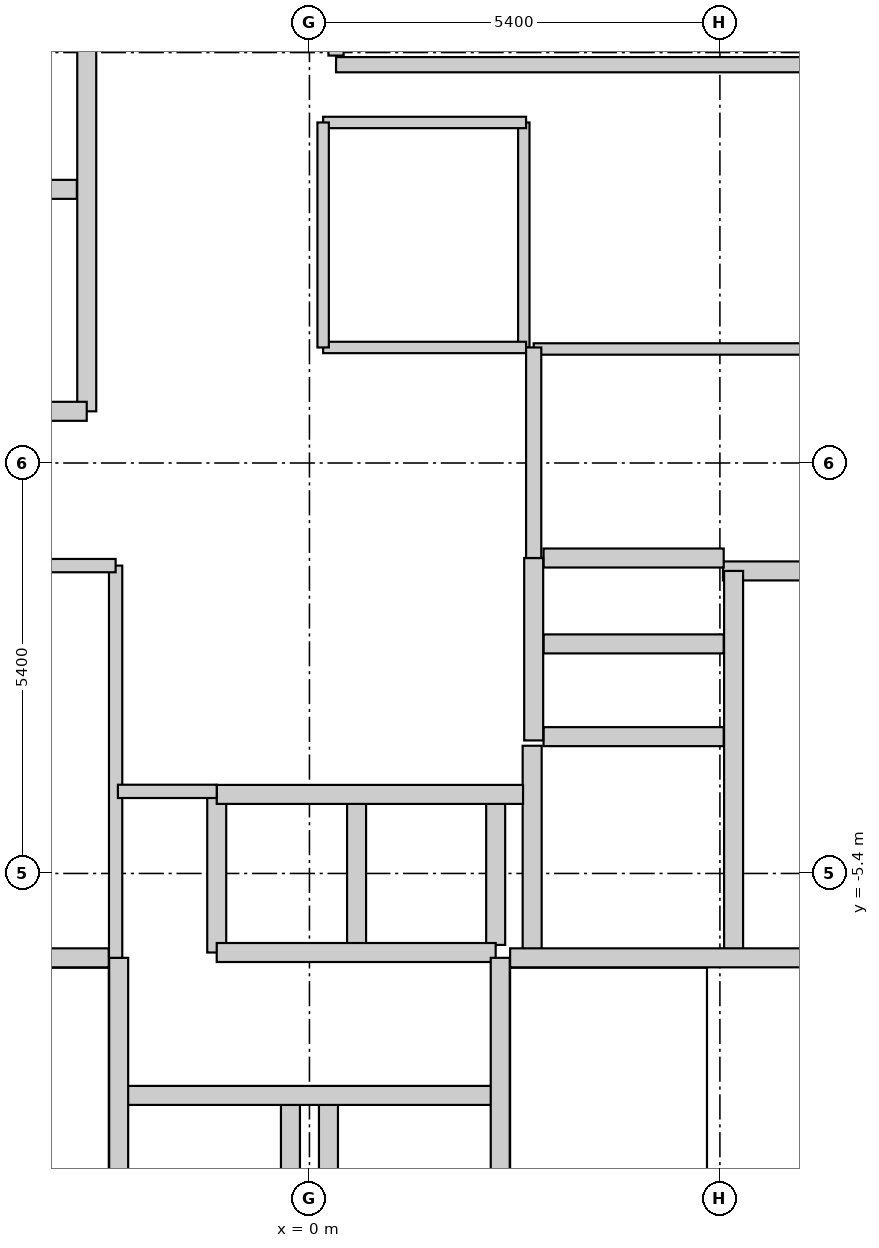
"""IFC4 building model, lengths in metres.
Left out: names, types, materials, properties, quantities, classifications, styles, units other than length and angle.
Written with IfcOpenShell. Run it as: python <this file> out.ifc"""

import sys

from ifc_helpers import new_model, si_unit, direction, frame, frame_2d, origin, place, context, subcontext, project, spatial, rectangle, extrude, element, fill, save


model = new_model("IFC4")
c1 = context("Model", 3, precision=1e-05, world=origin(), true_north=direction((0.0, 1.0)))
c2 = subcontext(c1, "Body", "Model", "MODEL_VIEW")
j1 = project(units=[si_unit("LENGTHUNIT", "METRE"), si_unit("PLANEANGLEUNIT", "RADIAN")], contexts=[c1])
p1 = place(None, origin())
s1 = spatial("IfcSite", under=j1, at=p1, CompositionType="ELEMENT")
p2 = place(p1, origin())
s2 = spatial("IfcBuilding", under=s1, at=p2, CompositionType="ELEMENT")
p3 = place(p2, frame((0.0, 0.0, 337.5)))
s3 = spatial("IfcBuildingStorey", under=s2, at=p3, CompositionType="ELEMENT", Elevation=337.5)
p4 = place(p3, frame((2.93, -6.51, 0.0), z_axis=(0.0, 0.0, 1.0), x_axis=(0.0, 1.0, 0.0)))
e1 = element("IfcWall", 1, at=p4, inside=s3, PredefinedType="SHEAR", context=c2, shape_type="SweptSolid", body=[
    extrude(rectangle(XDim=2.79, YDim=0.25, at=frame_2d((1.395, 0.0))), origin(), (0.0, 0.0, 1.0), 4.5),
])
p5 = place(p3, frame((5.44, -1.42, 0.0), z_axis=(0.0, 0.0, 1.0), x_axis=(1.0, 0.0, 0.0)))
e2 = element("IfcWall", 2, at=p5, inside=s3, PredefinedType="SHEAR", context=c2, shape_type="SweptSolid", body=[
    extrude(rectangle(XDim=4.9, YDim=0.25, at=frame_2d((2.45, 0.0))), origin(), (0.0, 0.0, 1.0), 4.5),
])
p6 = place(p5, frame((1.94, 0.0, 0.0)))
e3 = element("IfcOpeningElement", 3, at=p6, cuts=e2, PredefinedType="OPENING", context=c2, shape_type="SweptSolid", body=[
    extrude(rectangle(XDim=1.1, YDim=2.1, at=frame_2d((0.55, 1.05))), frame((0.0, 0.135, 0.0), z_axis=(0.0, -1.0, 0.0), x_axis=(1.0, 0.0, 0.0)), (0.0, 0.0, 1.0), 0.27),
])
p7 = place(p3, frame((3.08, -3.6, 0.0), z_axis=(0.0, 0.0, 1.0), x_axis=(1.0, 0.0, 0.0)))
e4 = element("IfcWall", 4, at=p7, inside=s3, PredefinedType="SHEAR", context=c2, shape_type="SweptSolid", body=[
    extrude(rectangle(XDim=2.37, YDim=0.25, at=frame_2d((1.185, 0.0))), origin(), (0.0, 0.0, 1.0), 4.5),
])
p8 = place(p3, frame((5.58, -6.51, 0.0), z_axis=(0.0, 0.0, 1.0), x_axis=(0.0, 1.0, 0.0)))
e5 = element("IfcWall", 5, at=p8, inside=s3, PredefinedType="SHEAR", context=c2, shape_type="SweptSolid", body=[
    extrude(rectangle(XDim=5.09, YDim=0.25, at=frame_2d((2.545, 0.0))), origin(), (0.0, 0.0, 1.0), 4.5),
])
p9 = place(p8, frame((0.85, 0.0, 0.0)))
e6 = element("IfcOpeningElement", 6, at=p9, cuts=e5, PredefinedType="OPENING", context=c2, shape_type="SweptSolid", body=[
    extrude(rectangle(XDim=1.1, YDim=2.1, at=frame_2d((0.55, 1.05))), frame((0.0, 0.135, 0.0), z_axis=(0.0, -1.0, 0.0), x_axis=(1.0, 0.0, 0.0)), (0.0, 0.0, 1.0), 0.27),
])
for number, where, z_axis, x_axis in (
    (7, (0.62, -6.34, 0.0), (0.0, 0.0, 1.0), (0.0, 1.0, 0.0)),
    (8, (2.45, -6.34, 0.0), (0.0, 0.0, 1.0), (0.0, 1.0, 0.0)),
):
    element("IfcWall", number, at=place(p3, frame(where, z_axis=z_axis, x_axis=x_axis)), inside=s3, PredefinedType="SHEAR", context=c2, shape_type="SweptSolid", body=[
        extrude(rectangle(XDim=1.88, YDim=0.25, at=frame_2d((0.94, 0.0))), origin(), (0.0, 0.0, 1.0), 4.5),
    ])
for number, where, z_axis, x_axis in (
    (9, (-0.25, -10.35, 0.0), (0.0, 0.0, 1.0), (0.0, 1.0, 0.0)),
    (10, (0.25, -10.35, 0.0), (0.0, 0.0, 1.0), (0.0, 1.0, 0.0)),
):
    element("IfcWall", number, at=place(p3, frame(where, z_axis=z_axis, x_axis=x_axis)), inside=s3, PredefinedType="SHEAR", context=c2, shape_type="SweptSolid", body=[
        extrude(rectangle(XDim=1.91, YDim=0.25, at=frame_2d((0.955, 0.0))), origin(), (0.0, 0.0, 1.0), 4.5),
    ])
p10 = place(p3, frame((-1.22, -6.44, 0.0), z_axis=(0.0, 0.0, 1.0), x_axis=(0.0, 1.0, 0.0)))
e11 = element("IfcWall", 11, at=p10, inside=s3, PredefinedType="SHEAR", context=c2, shape_type="SweptSolid", body=[
    extrude(rectangle(XDim=2.08, YDim=0.25, at=frame_2d((1.04, 0.0))), origin(), (0.0, 0.0, 1.0), 4.5),
])
p11 = place(p3, frame((-1.22, -6.44, 0.0), z_axis=(0.0, 0.0, 1.0), x_axis=(1.0, 0.0, 0.0)))
e12 = element("IfcWall", 12, at=p11, inside=s3, PredefinedType="SHEAR", context=c2, shape_type="SweptSolid", body=[
    extrude(rectangle(XDim=3.67, YDim=0.25, at=frame_2d((1.835, 0.0))), origin(), (0.0, 0.0, 1.0), 4.5),
])
p12 = place(p11, frame((0.35, 0.0, 0.0)))
e13 = element("IfcOpeningElement", 13, at=p12, cuts=e12, PredefinedType="OPENING", context=c2, shape_type="SweptSolid", body=[
    extrude(rectangle(XDim=1.1, YDim=2.1, at=frame_2d((0.55, 1.05))), frame((0.0, 0.135, 0.0), z_axis=(0.0, -1.0, 0.0), x_axis=(1.0, 0.0, 0.0)), (0.0, 0.0, 1.0), 0.27),
])
p13 = place(p11, frame((2.22, 0.0, 0.0)))
e14 = element("IfcOpeningElement", 14, at=p13, cuts=e12, PredefinedType="OPENING", context=c2, shape_type="SweptSolid", body=[
    extrude(rectangle(XDim=1.1, YDim=2.1, at=frame_2d((0.55, 1.05))), frame((0.0, 0.135, 0.0), z_axis=(0.0, -1.0, 0.0), x_axis=(1.0, 0.0, 0.0)), (0.0, 0.0, 1.0), 0.27),
])
p14 = place(p3, frame((-2.48, -8.32, 0.0), z_axis=(0.0, 0.0, 1.0), x_axis=(1.0, 0.0, 0.0)))
e15 = element("IfcWall", 15, at=p14, inside=s3, PredefinedType="SHEAR", context=c2, shape_type="SweptSolid", body=[
    extrude(rectangle(XDim=4.93, YDim=0.25, at=frame_2d((2.465, 0.0))), origin(), (0.0, 0.0, 1.0), 4.5),
])
p15 = place(p14, frame((0.55, 0.0, 0.0)))
e16 = element("IfcOpeningElement", 16, at=p15, cuts=e15, PredefinedType="OPENING", context=c2, shape_type="SweptSolid", body=[
    extrude(rectangle(XDim=1.1, YDim=2.1, at=frame_2d((0.55, 1.05))), frame((0.0, 0.135, 0.0), z_axis=(0.0, -1.0, 0.0), x_axis=(1.0, 0.0, 0.0)), (0.0, 0.0, 1.0), 0.27),
])
p16 = place(p14, frame((3.25, 0.0, 0.0)))
e17 = element("IfcOpeningElement", 17, at=p16, cuts=e15, PredefinedType="OPENING", context=c2, shape_type="SweptSolid", body=[
    extrude(rectangle(XDim=1.1, YDim=2.1, at=frame_2d((0.55, 1.05))), frame((0.0, 0.135, 0.0), z_axis=(0.0, -1.0, 0.0), x_axis=(1.0, 0.0, 0.0)), (0.0, 0.0, 1.0), 0.27),
])
p17 = place(p3, frame((-1.22, -4.36, 0.0), z_axis=(0.0, 0.0, 1.0), x_axis=(1.0, 0.0, 0.0)))
e18 = element("IfcWall", 18, at=p17, inside=s3, PredefinedType="SHEAR", context=c2, shape_type="SweptSolid", body=[
    extrude(rectangle(XDim=4.03, YDim=0.25, at=frame_2d((2.015, 0.0))), origin(), (0.0, 0.0, 1.0), 4.5),
])
for number, where, z_axis, x_axis in (
    (19, (3.08, -2.38, 0.0), (0.0, 0.0, 1.0), (1.0, 0.0, 0.0)),
    (20, (3.08, -1.25, 0.0), (0.0, 0.0, 1.0), (1.0, 0.0, 0.0)),
):
    element("IfcWall", number, at=place(p3, frame(where, z_axis=z_axis, x_axis=x_axis)), inside=s3, PredefinedType="SHEAR", context=c2, shape_type="SweptSolid", body=[
        extrude(rectangle(XDim=2.37, YDim=0.25, at=frame_2d((1.185, 0.0))), origin(), (0.0, 0.0, 1.0), 4.5),
    ])
p18 = place(p3, frame((2.95, -3.65, 0.0), z_axis=(0.0, 0.0, 1.0), x_axis=(0.0, 1.0, 0.0)))
e21 = element("IfcWall", 21, at=p18, inside=s3, PredefinedType="SHEAR", context=c2, shape_type="SweptSolid", body=[
    extrude(rectangle(XDim=2.4, YDim=0.25, at=frame_2d((1.2, 0.0))), origin(), (0.0, 0.0, 1.0), 4.5),
])
p19 = place(p18, frame((0.775, 0.0, 0.0)))
e22 = element("IfcOpeningElement", 22, at=p19, cuts=e21, PredefinedType="OPENING", context=c2, shape_type="SweptSolid", body=[
    extrude(rectangle(XDim=0.85, YDim=2.1, at=frame_2d((0.425, 1.05))), frame((0.0, 0.135, 0.0), z_axis=(0.0, -1.0, 0.0), x_axis=(1.0, 0.0, 0.0)), (0.0, 0.0, 1.0), 0.27),
])
p20 = place(p3, frame((2.64, -6.51, 0.0), z_axis=(0.0, 0.0, 1.0), x_axis=(1.0, 0.0, 0.0)))
e23 = element("IfcWall", 23, at=p20, inside=s3, PredefinedType="SHEAR", context=c2, shape_type="SweptSolid", body=[
    extrude(rectangle(XDim=7.7, YDim=0.25, at=frame_2d((3.85, 0.0))), origin(), (0.0, 0.0, 1.0), 4.5),
])
p21 = place(p20, frame((6.0, 0.0, 0.0)))
e24 = element("IfcOpeningElement", 24, at=p21, cuts=e23, PredefinedType="OPENING", context=c2, shape_type="SweptSolid", body=[
    extrude(rectangle(XDim=0.95, YDim=2.1, at=frame_2d((0.475, 1.05))), frame((0.0, 0.135, 0.0), z_axis=(0.0, -1.0, 0.0), x_axis=(1.0, 0.0, 0.0)), (0.0, 0.0, 1.0), 0.27),
])
for number, where, z_axis, x_axis in (
    (25, (2.51, -10.55, 0.0), (0.0, 0.0, 1.0), (0.0, 1.0, 0.0)),
    (26, (-2.51, -10.55, 0.0), (0.0, 0.0, 1.0), (0.0, 1.0, 0.0)),
):
    element("IfcWall", number, at=place(p3, frame(where, z_axis=z_axis, x_axis=x_axis)), inside=s3, PredefinedType="SHEAR", context=c2, shape_type="SweptSolid", body=[
        extrude(rectangle(XDim=4.04, YDim=0.25, at=frame_2d((2.02, 0.0))), origin(), (0.0, 0.0, 1.0), 4.5),
    ])
p22 = place(p3, frame((-10.34, -6.51, 0.0), z_axis=(0.0, 0.0, 1.0), x_axis=(1.0, 0.0, 0.0)))
e27 = element("IfcWall", 27, at=p22, inside=s3, PredefinedType="SHEAR", context=c2, shape_type="SweptSolid", body=[
    extrude(rectangle(XDim=7.7, YDim=0.25, at=frame_2d((3.85, 0.0))), origin(), (0.0, 0.0, 1.0), 4.5),
])
p23 = place(p22, frame((0.35, 0.0, 0.0)))
e28 = element("IfcOpeningElement", 28, at=p23, cuts=e27, PredefinedType="OPENING", context=c2, shape_type="SweptSolid", body=[
    extrude(rectangle(XDim=1.1, YDim=2.1, at=frame_2d((0.55, 1.05))), frame((0.0, 0.135, 0.0), z_axis=(0.0, -1.0, 0.0), x_axis=(1.0, 0.0, 0.0)), (0.0, 0.0, 1.0), 0.27),
])
p24 = place(p3, frame((-2.93, 0.68, 0.0), z_axis=(0.0, 0.0, 1.0), x_axis=(0.0, 1.0, 0.0)))
e29 = element("IfcWall", 29, at=p24, inside=s3, PredefinedType="SHEAR", context=c2, shape_type="SweptSolid", body=[
    extrude(rectangle(XDim=5.83, YDim=0.25, at=frame_2d((2.915, 0.0))), origin(), (0.0, 0.0, 1.0), 4.5),
])
p25 = place(p24, frame((0.75, 0.0, 0.0)))
e30 = element("IfcOpeningElement", 30, at=p25, cuts=e29, PredefinedType="OPENING", context=c2, shape_type="SweptSolid", body=[
    extrude(rectangle(XDim=1.2, YDim=2.1, at=frame_2d((0.6, 1.05))), frame((0.0, 0.135, 0.0), z_axis=(0.0, -1.0, 0.0), x_axis=(1.0, 0.0, 0.0)), (0.0, 0.0, 1.0), 0.27),
])
p26 = place(p3, frame((-5.45, 3.6, 0.0), z_axis=(0.0, 0.0, 1.0), x_axis=(1.0, 0.0, 0.0)))
e31 = element("IfcWall", 31, at=p26, inside=s3, PredefinedType="SHEAR", context=c2, shape_type="SweptSolid", body=[
    extrude(rectangle(XDim=2.39, YDim=0.25, at=frame_2d((1.195, 0.0))), origin(), (0.0, 0.0, 1.0), 4.5),
])
p27 = place(p3, frame((-5.58, 0.68, 0.0), z_axis=(0.0, 0.0, 1.0), x_axis=(1.0, 0.0, 0.0)))
e32 = element("IfcWall", 32, at=p27, inside=s3, PredefinedType="SHEAR", context=c2, shape_type="SweptSolid", body=[
    extrude(rectangle(XDim=2.65, YDim=0.25, at=frame_2d((1.325, 0.0))), origin(), (0.0, 0.0, 1.0), 4.5),
])
p28 = place(p3, frame((2.82, 1.52, 0.0), z_axis=(0.0, 0.0, 1.0), x_axis=(0.0, 1.0, 0.0)))
e33 = element("IfcWall", 33, at=p28, inside=s3, PredefinedType="PARTITIONING", context=c2, shape_type="SweptSolid", body=[
    extrude(rectangle(XDim=2.96, YDim=0.15, at=frame_2d((1.48, 0.0))), origin(), (0.0, 0.0, 1.0), 4.22),
])
for number, where, z_axis, x_axis in (
    (34, (0.18, 4.48, 0.0), (0.0, 0.0, 1.0), (1.0, 0.0, 0.0)),
    (35, (0.18, 1.52, 0.0), (0.0, 0.0, 1.0), (1.0, 0.0, 0.0)),
):
    element("IfcWall", number, at=place(p3, frame(where, z_axis=z_axis, x_axis=x_axis)), inside=s3, PredefinedType="PARTITIONING", context=c2, shape_type="SweptSolid", body=[
        extrude(rectangle(XDim=2.67, YDim=0.15, at=frame_2d((1.335, 0.0))), origin(), (0.0, 0.0, 1.0), 4.22),
    ])
p29 = place(p3, frame((0.18, 1.52, 0.0), z_axis=(0.0, 0.0, 1.0), x_axis=(0.0, 1.0, 0.0)))
e36 = element("IfcWall", 36, at=p29, inside=s3, PredefinedType="PARTITIONING", context=c2, shape_type="SweptSolid", body=[
    extrude(rectangle(XDim=2.96, YDim=0.15, at=frame_2d((1.48, 0.0))), origin(), (0.0, 0.0, 1.0), 4.22),
])
p30 = place(p29, frame((0.95, 0.0, 0.0)))
e37 = element("IfcOpeningElement", 37, at=p30, cuts=e36, PredefinedType="OPENING", context=c2, shape_type="SweptSolid", body=[
    extrude(rectangle(XDim=0.85, YDim=2.1, at=frame_2d((0.425, 1.05))), frame((0.0, 0.085, 0.0), z_axis=(0.0, -1.0, 0.0), x_axis=(1.0, 0.0, 0.0)), (0.0, 0.0, 1.0), 0.17),
])
p31 = place(p3, frame((2.95, 1.5, 0.0), z_axis=(0.0, 0.0, 1.0), x_axis=(1.0, 0.0, 0.0)))
e38 = element("IfcWall", 38, at=p31, inside=s3, PredefinedType="PARTITIONING", context=c2, shape_type="SweptSolid", body=[
    extrude(rectangle(XDim=7.39, YDim=0.15, at=frame_2d((3.695, 0.0))), origin(), (0.0, 0.0, 1.0), 4.22),
])
p32 = place(p31, frame((2.2, 0.0, 0.0)))
e39 = element("IfcOpeningElement", 39, at=p32, cuts=e38, PredefinedType="OPENING", context=c2, shape_type="SweptSolid", body=[
    extrude(rectangle(XDim=0.95, YDim=2.1, at=frame_2d((0.475, 1.05))), frame((0.0, 0.085, 0.0), z_axis=(0.0, -1.0, 0.0), x_axis=(1.0, 0.0, 0.0)), (0.0, 0.0, 1.0), 0.17),
])
p33 = place(p3, frame((0.35, 5.24, 0.0), z_axis=(0.0, 0.0, 1.0), x_axis=(1.0, 0.0, 0.0)))
e40 = element("IfcWall", 40, at=p33, inside=s3, PredefinedType="PARTITIONING", context=c2, shape_type="SweptSolid", body=[
    extrude(rectangle(XDim=9.99, YDim=0.2, at=frame_2d((4.995, 0.0))), origin(), (0.0, 0.0, 1.0), 4.22),
])
p34 = place(p33, frame((0.8, 0.0, 0.0)))
e41 = element("IfcOpeningElement", 41, at=p34, cuts=e40, PredefinedType="OPENING", context=c2, shape_type="SweptSolid", body=[
    extrude(rectangle(XDim=1.1, YDim=2.1, at=frame_2d((0.55, 1.05))), frame((0.0, 0.11, 0.0), z_axis=(0.0, -1.0, 0.0), x_axis=(1.0, 0.0, 0.0)), (0.0, 0.0, 1.0), 0.22),
])
p35 = place(p3, frame((0.35, 5.36, 0.0), z_axis=(0.0, 0.0, 1.0), x_axis=(0.0, 1.0, 0.0)))
e42 = element("IfcWall", 42, at=p35, inside=s3, PredefinedType="PARTITIONING", context=c2, shape_type="SweptSolid", body=[
    extrude(rectangle(XDim=4.98, YDim=0.2, at=frame_2d((2.49, 0.0))), origin(), (0.0, 0.0, 1.0), 4.22),
])
p36 = place(p3, frame((-2.55, -6.51, 0.0), z_axis=(0.0, 0.0, 1.0), x_axis=(0.0, 1.0, 0.0)))
e43 = element("IfcWall", 43, at=p36, inside=s3, PredefinedType="PARTITIONING", context=c2, shape_type="SweptSolid", body=[
    extrude(rectangle(XDim=5.16, YDim=0.175, at=frame_2d((2.58, 0.0))), origin(), (0.0, 0.0, 1.0), 4.22),
])
p37 = place(p36, frame((0.95, 0.0, 0.0)))
e44 = element("IfcOpeningElement", 44, at=p37, cuts=e43, PredefinedType="OPENING", context=c2, shape_type="SweptSolid", body=[
    extrude(rectangle(XDim=0.85, YDim=2.1, at=frame_2d((0.425, 1.05))), frame((0.0, 0.097, 0.0), z_axis=(0.0, -1.0, 0.0), x_axis=(1.0, 0.0, 0.0)), (0.0, 0.0, 1.0), 0.195),
])
p38 = place(p3, frame((-7.18, -1.35, 0.0), z_axis=(0.0, 0.0, 1.0), x_axis=(1.0, 0.0, 0.0)))
e45 = element("IfcWall", 45, at=p38, inside=s3, PredefinedType="PARTITIONING", context=c2, shape_type="SweptSolid", body=[
    extrude(rectangle(XDim=4.63, YDim=0.175, at=frame_2d((2.315, 0.0))), origin(), (0.0, 0.0, 1.0), 4.22),
])
p39 = place(p3, frame((-2.52, -4.32, 0.0), z_axis=(0.0, 0.0, 1.0), x_axis=(1.0, 0.0, 0.0)))
e46 = element("IfcWall", 46, at=p39, inside=s3, PredefinedType="PARTITIONING", context=c2, shape_type="SweptSolid", body=[
    extrude(rectangle(XDim=1.3, YDim=0.175, at=frame_2d((0.65, 0.0))), origin(), (0.0, 0.0, 1.0), 4.22),
])
p40 = place(p39, frame((0.22, 0.0, 0.0)))
e47 = element("IfcOpeningElement", 47, at=p40, cuts=e46, PredefinedType="OPENING", context=c2, shape_type="SweptSolid", body=[
    extrude(rectangle(XDim=0.85, YDim=2.1, at=frame_2d((0.425, 1.05))), frame((0.0, 0.097, 0.0), z_axis=(0.0, -1.0, 0.0), x_axis=(1.0, 0.0, 0.0)), (0.0, 0.0, 1.0), 0.195),
])
p41 = place(p3, frame((2.95, -1.25, 0.0), z_axis=(0.0, 0.0, 1.0), x_axis=(0.0, 1.0, 0.0)))
e48 = element("IfcWall", 48, at=p41, inside=s3, PredefinedType="PARTITIONING", context=c2, shape_type="SweptSolid", body=[
    extrude(rectangle(XDim=2.77, YDim=0.2, at=frame_2d((1.385, 0.0))), origin(), (0.0, 0.0, 1.0), 4.22),
])
p42 = place(p41, frame((0.6, 0.0, 0.0)))
e49 = element("IfcOpeningElement", 49, at=p42, cuts=e48, PredefinedType="OPENING", context=c2, shape_type="SweptSolid", body=[
    extrude(rectangle(XDim=1.1, YDim=2.1, at=frame_2d((0.55, 1.05))), frame((0.0, 0.11, 0.0), z_axis=(0.0, -1.0, 0.0), x_axis=(1.0, 0.0, 0.0)), (0.0, 0.0, 1.0), 0.22),
])
p43 = place(p30, origin())
e50 = element("IfcDoor", 50, at=p43, inside=s3, OperationType="SINGLE_SWING_RIGHT", PredefinedType="DOOR", context=c2, shape_type="SweptSolid", body=[
    extrude(rectangle(XDim=0.85, YDim=2.1, at=frame_2d((0.425, 1.05))), frame((0.0, 0.025, 0.0), z_axis=(0.0, -1.0, 0.0), x_axis=(1.0, 0.0, 0.0)), (0.0, 0.0, 1.0), 0.05),
])
fill(e37, e50)
p44 = place(p19, origin())
e51 = element("IfcDoor", 51, at=p44, inside=s3, OperationType="SINGLE_SWING_LEFT", PredefinedType="DOOR", context=c2, shape_type="SweptSolid", body=[
    extrude(rectangle(XDim=0.85, YDim=2.1, at=frame_2d((0.425, 1.05))), frame((0.0, 0.025, 0.0), z_axis=(0.0, -1.0, 0.0), x_axis=(1.0, 0.0, 0.0)), (0.0, 0.0, 1.0), 0.05),
])
fill(e22, e51)
p45 = place(p9, origin())
e52 = element("IfcDoor", 52, at=p45, inside=s3, OperationType="SLIDING_TO_RIGHT", PredefinedType="DOOR", context=c2, shape_type="SweptSolid", body=[
    extrude(rectangle(XDim=1.1, YDim=2.1, at=frame_2d((0.55, 1.05))), frame((0.0, 0.025, 0.0), z_axis=(0.0, -1.0, 0.0), x_axis=(1.0, 0.0, 0.0)), (0.0, 0.0, 1.0), 0.05),
])
fill(e6, e52)
p46 = place(p25, origin())
e53 = element("IfcDoor", 53, at=p46, inside=s3, OperationType="SLIDING_TO_LEFT", PredefinedType="DOOR", context=c2, shape_type="SweptSolid", body=[
    extrude(rectangle(XDim=1.2, YDim=2.1, at=frame_2d((0.6, 1.05))), frame((0.0, 0.025, 0.0), z_axis=(0.0, -1.0, 0.0), x_axis=(1.0, 0.0, 0.0)), (0.0, 0.0, 1.0), 0.05),
])
fill(e30, e53)
p47 = place(p34, origin())
e54 = element("IfcDoor", 54, at=p47, inside=s3, OperationType="SINGLE_SWING_LEFT", PredefinedType="DOOR", context=c2, shape_type="SweptSolid", body=[
    extrude(rectangle(XDim=1.1, YDim=2.1, at=frame_2d((0.55, 1.05))), frame((0.0, 0.025, 0.0), z_axis=(0.0, -1.0, 0.0), x_axis=(1.0, 0.0, 0.0)), (0.0, 0.0, 1.0), 0.05),
])
fill(e41, e54)
p48 = place(p42, origin())
e55 = element("IfcDoor", 55, at=p48, inside=s3, OperationType="SINGLE_SWING_LEFT", PredefinedType="DOOR", context=c2, shape_type="SweptSolid", body=[
    extrude(rectangle(XDim=1.1, YDim=2.1, at=frame_2d((0.55, 1.05))), frame((0.0, 0.025, 0.0), z_axis=(0.0, -1.0, 0.0), x_axis=(1.0, 0.0, 0.0)), (0.0, 0.0, 1.0), 0.05),
])
fill(e49, e55)
p49 = place(p32, origin())
e56 = element("IfcDoor", 56, at=p49, inside=s3, OperationType="SINGLE_SWING_RIGHT", PredefinedType="DOOR", context=c2, shape_type="SweptSolid", body=[
    extrude(rectangle(XDim=0.95, YDim=2.1, at=frame_2d((0.475, 1.05))), frame((0.0, 0.025, 0.0), z_axis=(0.0, -1.0, 0.0), x_axis=(1.0, 0.0, 0.0)), (0.0, 0.0, 1.0), 0.05),
])
fill(e39, e56)
p50 = place(p40, origin())
e57 = element("IfcDoor", 57, at=p50, inside=s3, OperationType="SINGLE_SWING_LEFT", PredefinedType="DOOR", context=c2, shape_type="SweptSolid", body=[
    extrude(rectangle(XDim=0.85, YDim=2.1, at=frame_2d((0.425, 1.05))), frame((0.0, 0.025, 0.0), z_axis=(0.0, -1.0, 0.0), x_axis=(1.0, 0.0, 0.0)), (0.0, 0.0, 1.0), 0.05),
])
fill(e47, e57)
p51 = place(p12, origin())
e58 = element("IfcDoor", 58, at=p51, inside=s3, OperationType="SLIDING_TO_LEFT", PredefinedType="DOOR", context=c2, shape_type="SweptSolid", body=[
    extrude(rectangle(XDim=1.1, YDim=2.1, at=frame_2d((0.55, 1.05))), frame((0.0, 0.025, 0.0), z_axis=(0.0, -1.0, 0.0), x_axis=(1.0, 0.0, 0.0)), (0.0, 0.0, 1.0), 0.05),
])
fill(e13, e58)
p52 = place(p13, origin())
e59 = element("IfcDoor", 59, at=p52, inside=s3, OperationType="SLIDING_TO_LEFT", PredefinedType="DOOR", context=c2, shape_type="SweptSolid", body=[
    extrude(rectangle(XDim=1.1, YDim=2.1, at=frame_2d((0.55, 1.05))), frame((0.0, 0.025, 0.0), z_axis=(0.0, -1.0, 0.0), x_axis=(1.0, 0.0, 0.0)), (0.0, 0.0, 1.0), 0.05),
])
fill(e14, e59)
p53 = place(p15, origin())
e60 = element("IfcDoor", 60, at=p53, inside=s3, OperationType="SLIDING_TO_LEFT", PredefinedType="DOOR", context=c2, shape_type="SweptSolid", body=[
    extrude(rectangle(XDim=1.1, YDim=2.1, at=frame_2d((0.55, 1.05))), frame((0.0, 0.025, 0.0), z_axis=(0.0, -1.0, 0.0), x_axis=(1.0, 0.0, 0.0)), (0.0, 0.0, 1.0), 0.05),
])
fill(e16, e60)
p54 = place(p16, origin())
e61 = element("IfcDoor", 61, at=p54, inside=s3, OperationType="SLIDING_TO_LEFT", PredefinedType="DOOR", context=c2, shape_type="SweptSolid", body=[
    extrude(rectangle(XDim=1.1, YDim=2.1, at=frame_2d((0.55, 1.05))), frame((0.0, 0.025, 0.0), z_axis=(0.0, -1.0, 0.0), x_axis=(1.0, 0.0, 0.0)), (0.0, 0.0, 1.0), 0.05),
])
fill(e17, e61)
p55 = place(p37, origin())
e62 = element("IfcDoor", 62, at=p55, inside=s3, OperationType="SINGLE_SWING_LEFT", PredefinedType="DOOR", context=c2, shape_type="SweptSolid", body=[
    extrude(rectangle(XDim=0.85, YDim=2.1, at=frame_2d((0.425, 1.05))), frame((0.0, 0.025, 0.0), z_axis=(0.0, -1.0, 0.0), x_axis=(1.0, 0.0, 0.0)), (0.0, 0.0, 1.0), 0.05),
])
fill(e44, e62)
save(model, sys.argv[1])
